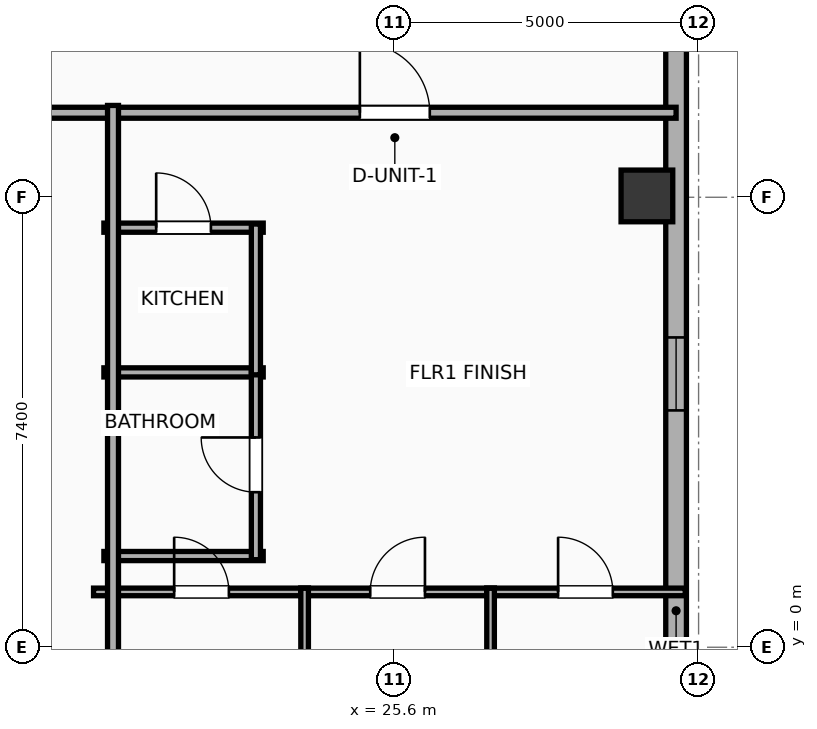
"""IFC4 building model, lengths in metres.
Left out: names, types, materials, properties, quantities, classifications, styles, units other than length and angle.
Written with IfcOpenShell. Run it as: python <this file> out.ifc"""

import sys

from ifc_helpers import new_model, si_unit, direction, frame, frame_2d, origin, origin_2d, place, context, subcontext, project, spatial, rectangle, hollow_rectangle, extrude, element, fill, save


model = new_model("IFC4")
c1 = context("Model", 3, precision=1e-05, world=origin(), true_north=direction((0.0, 1.0)))
c2 = subcontext(c1, "Body", "Model", "MODEL_VIEW")
j1 = project(units=[si_unit("LENGTHUNIT", "METRE"), si_unit("PLANEANGLEUNIT", "RADIAN")], contexts=[c1])
p1 = place(None, origin())
s1 = spatial("IfcSite", under=j1, at=p1, CompositionType="ELEMENT")
p2 = place(p1, origin())
s2 = spatial("IfcBuilding", under=s1, at=p2, CompositionType="ELEMENT")
p3 = place(p2, frame((0.0, 0.0, 208.0)))
s3 = spatial("IfcBuildingStorey", under=s2, at=p3, CompositionType="ELEMENT", Elevation=208.0)
p4 = place(p3, frame((29.75, 7.422, 0.0), z_axis=(0.0, 0.0, 1.0), x_axis=(1.0, 0.0, 0.0)))
e1 = element("IfcColumn", 1, at=p4, inside=s3, PredefinedType="COLUMN", context=c2, shape_type="SweptSolid", body=[
    extrude(hollow_rectangle(XDim=0.85, YDim=0.85, WallThickness=0.028, at=origin_2d()), origin(), (0.0, 0.0, 1.0), 3.9),
])
p5 = place(p3, frame((30.23, 16.583, 0.0), z_axis=(0.0, 0.0, 1.0), x_axis=(0.0, -1.0, 0.0)))
e2 = element("IfcWall", 2, at=p5, inside=s3, PredefinedType="ELEMENTEDWALL", context=c2, shape_type="SweptSolid", body=[
    extrude(rectangle(XDim=31.967, YDim=0.34, at=frame_2d((15.983, 0.0))), origin(), (0.0, 0.0, 1.0), 3.65),
])
p6 = place(p5, frame((29.844, 0.0, 0.75)))
e3 = element("IfcOpeningElement", 3, at=p6, cuts=e2, PredefinedType="OPENING", context=c2, shape_type="SweptSolid", body=[
    extrude(rectangle(XDim=1.2, YDim=2.05, at=frame_2d((0.6, 1.025))), frame((0.0, 0.18, 0.0), z_axis=(0.0, -1.0, 0.0), x_axis=(1.0, 0.0, 0.0)), (0.0, 0.0, 1.0), 0.36),
])
p7 = place(p5, frame((11.488, 0.0, 0.75)))
e4 = element("IfcOpeningElement", 4, at=p7, cuts=e2, PredefinedType="OPENING", context=c2, shape_type="SweptSolid", body=[
    extrude(rectangle(XDim=1.2, YDim=2.05, at=frame_2d((0.6, 1.025))), frame((0.0, 0.18, 0.0), z_axis=(0.0, -1.0, 0.0), x_axis=(1.0, 0.0, 0.0)), (0.0, 0.0, 1.0), 0.36),
])
p8 = place(p5, frame((20.338, 0.0, 0.75)))
e5 = element("IfcOpeningElement", 5, at=p8, cuts=e2, PredefinedType="OPENING", context=c2, shape_type="SweptSolid", body=[
    extrude(rectangle(XDim=1.2, YDim=2.05, at=frame_2d((0.6, 1.025))), frame((0.0, 0.18, 0.0), z_axis=(0.0, -1.0, 0.0), x_axis=(1.0, 0.0, 0.0)), (0.0, 0.0, 1.0), 0.36),
])
p9 = place(p3, frame((9.88, 8.79, 0.0), z_axis=(0.0, 0.0, 1.0), x_axis=(1.0, 0.0, 0.0)))
e6 = element("IfcWall", 6, at=p9, inside=s3, PredefinedType="PARTITIONING", context=c2, shape_type="SweptSolid", body=[
    extrude(rectangle(XDim=20.35, YDim=0.18, at=frame_2d((10.175, 0.0))), origin(), (0.0, 0.0, 1.0), 3.65),
])
p10 = place(p9, frame((15.149, 0.0, 0.0)))
e7 = element("IfcOpeningElement", 7, at=p10, cuts=e6, PredefinedType="OPENING", context=c2, shape_type="SweptSolid", body=[
    extrude(rectangle(XDim=1.15, YDim=2.05, at=frame_2d((0.575, 1.025))), frame((0.0, 0.1, 0.0), z_axis=(0.0, -1.0, 0.0), x_axis=(1.0, 0.0, 0.0)), (0.0, 0.0, 1.0), 0.2),
])
p11 = place(p3, frame((20.82, 6.9, 0.0), z_axis=(0.0, 0.0, 1.0), x_axis=(1.0, 0.0, 0.0)))
e8 = element("IfcWall", 8, at=p11, inside=s3, PredefinedType="PLUMBINGWALL", context=c2, shape_type="SweptSolid", body=[
    extrude(rectangle(XDim=2.62, YDim=0.15, at=frame_2d((1.31, 0.0))), origin(), (0.0, 0.0, 1.0), 3.65),
])
p12 = place(p11, frame((0.86, 0.0, 0.0)))
e9 = element("IfcOpeningElement", 9, at=p12, cuts=e8, PredefinedType="OPENING", context=c2, shape_type="SweptSolid", body=[
    extrude(rectangle(XDim=0.9, YDim=2.05, at=frame_2d((0.45, 1.025))), frame((0.0, 0.085, 0.0), z_axis=(0.0, -1.0, 0.0), x_axis=(1.0, 0.0, 0.0)), (0.0, 0.0, 1.0), 0.17),
])
for number, where, z_axis, x_axis in (
    (10, (20.82, 4.52, 0.0), (0.0, 0.0, 1.0), (1.0, 0.0, 0.0)),
    (11, (20.82, 1.5, 0.0), (0.0, 0.0, 1.0), (1.0, 0.0, 0.0)),
):
    element("IfcWall", number, at=place(p3, frame(where, z_axis=z_axis, x_axis=x_axis)), inside=s3, PredefinedType="PLUMBINGWALL", context=c2, shape_type="SweptSolid", body=[
        extrude(rectangle(XDim=2.62, YDim=0.15, at=frame_2d((1.31, 0.0))), origin(), (0.0, 0.0, 1.0), 3.65),
    ])
p13 = place(p3, frame((23.32, 1.44, 0.0), z_axis=(0.0, 0.0, 1.0), x_axis=(0.0, 1.0, 0.0)))
e12 = element("IfcWall", 12, at=p13, inside=s3, PredefinedType="PLUMBINGWALL", context=c2, shape_type="SweptSolid", body=[
    extrude(rectangle(XDim=3.12, YDim=0.15, at=frame_2d((1.56, 0.0))), origin(), (0.0, 0.0, 1.0), 3.65),
])
p14 = place(p13, frame((1.11, 0.0, 0.0)))
e13 = element("IfcOpeningElement", 13, at=p14, cuts=e12, PredefinedType="OPENING", context=c2, shape_type="SweptSolid", body=[
    extrude(rectangle(XDim=0.9, YDim=2.05, at=frame_2d((0.45, 1.025))), frame((0.0, 0.085, 0.0), z_axis=(0.0, -1.0, 0.0), x_axis=(1.0, 0.0, 0.0)), (0.0, 0.0, 1.0), 0.17),
])
p15 = place(p3, frame((23.32, 4.48, 0.0), z_axis=(0.0, 0.0, 1.0), x_axis=(0.0, 1.0, 0.0)))
e14 = element("IfcWall", 14, at=p15, inside=s3, PredefinedType="PLUMBINGWALL", context=c2, shape_type="SweptSolid", body=[
    extrude(rectangle(XDim=2.48, YDim=0.15, at=frame_2d((1.24, 0.0))), origin(), (0.0, 0.0, 1.0), 3.65),
])
p16 = place(p3, frame((20.65, 0.91, 0.0), z_axis=(0.0, 0.0, 1.0), x_axis=(1.0, 0.0, 0.0)))
e15 = element("IfcWall", 15, at=p16, inside=s3, PredefinedType="PARTITIONING", context=c2, shape_type="SweptSolid", body=[
    extrude(rectangle(XDim=3.534, YDim=0.125, at=frame_2d((1.767, 0.0))), origin(), (0.0, 0.0, 1.0), 3.65),
])
p17 = place(p16, frame((1.325, 0.0, 0.0)))
e16 = element("IfcOpeningElement", 16, at=p17, cuts=e15, PredefinedType="OPENING", context=c2, shape_type="SweptSolid", body=[
    extrude(rectangle(XDim=0.9, YDim=2.05, at=frame_2d((0.45, 1.025))), frame((0.0, 0.073, 0.0), z_axis=(0.0, -1.0, 0.0), x_axis=(1.0, 0.0, 0.0)), (0.0, 0.0, 1.0), 0.145),
])
p18 = place(p3, frame((24.059, 0.91, 0.0), z_axis=(0.0, 0.0, 1.0), x_axis=(1.0, 0.0, 0.0)))
e17 = element("IfcWall", 17, at=p18, inside=s3, PredefinedType="PARTITIONING", context=c2, shape_type="SweptSolid", body=[
    extrude(rectangle(XDim=3.183, YDim=0.125, at=frame_2d((1.591, 0.0))), origin(), (0.0, 0.0, 1.0), 3.65),
])
p19 = place(p18, frame((1.142, 0.0, 0.0)))
e18 = element("IfcOpeningElement", 18, at=p19, cuts=e17, PredefinedType="OPENING", context=c2, shape_type="SweptSolid", body=[
    extrude(rectangle(XDim=0.9, YDim=2.05, at=frame_2d((0.45, 1.025))), frame((0.0, 0.073, 0.0), z_axis=(0.0, -1.0, 0.0), x_axis=(1.0, 0.0, 0.0)), (0.0, 0.0, 1.0), 0.145),
])
p20 = place(p3, frame((27.116, 0.91, 0.0), z_axis=(0.0, 0.0, 1.0), x_axis=(1.0, 0.0, 0.0)))
e19 = element("IfcWall", 19, at=p20, inside=s3, PredefinedType="PARTITIONING", context=c2, shape_type="SweptSolid", body=[
    extrude(rectangle(XDim=3.263, YDim=0.125, at=frame_2d((1.632, 0.0))), origin(), (0.0, 0.0, 1.0), 3.65),
])
p21 = place(p20, frame((1.173, 0.0, 0.0)))
e20 = element("IfcOpeningElement", 20, at=p21, cuts=e19, PredefinedType="OPENING", context=c2, shape_type="SweptSolid", body=[
    extrude(rectangle(XDim=0.9, YDim=2.05, at=frame_2d((0.45, 1.025))), frame((0.0, 0.073, 0.0), z_axis=(0.0, -1.0, 0.0), x_axis=(1.0, 0.0, 0.0)), (0.0, 0.0, 1.0), 0.145),
])
for number, where, z_axis, x_axis in (
    (21, (27.179, -9.11, 0.0), (0.0, 0.0, 1.0), (0.0, 1.0, 0.0)),
    (22, (24.121, -9.11, 0.0), (0.0, 0.0, 1.0), (0.0, 1.0, 0.0)),
):
    element("IfcWall", number, at=place(p3, frame(where, z_axis=z_axis, x_axis=x_axis)), inside=s3, PredefinedType="PARTITIONING", context=c2, shape_type="SweptSolid", body=[
        extrude(rectangle(XDim=10.08, YDim=0.125, at=frame_2d((5.04, 0.0))), origin(), (0.0, 0.0, 1.0), 3.65),
    ])
p22 = place(p3, frame((20.97, -8.91, 0.0), z_axis=(0.0, 0.0, 1.0), x_axis=(0.0, 1.0, 0.0)))
e23 = element("IfcWall", 23, at=p22, inside=s3, PredefinedType="PARTITIONING", context=c2, shape_type="SweptSolid", body=[
    extrude(rectangle(XDim=17.82, YDim=0.18, at=frame_2d((8.91, 0.0))), origin(), (0.0, 0.0, 1.0), 3.65),
])
p23 = place(p7, origin())
e24 = element("IfcWindow", 24, at=p23, inside=s3, PartitioningType="SINGLE_PANEL", PredefinedType="WINDOW", context=c2, shape_type="SweptSolid", body=[
    extrude(rectangle(XDim=1.2, YDim=2.05, at=frame_2d((0.6, 1.025))), frame((0.0, 0.03, 0.0), z_axis=(0.0, -1.0, 0.0), x_axis=(1.0, 0.0, 0.0)), (0.0, 0.0, 1.0), 0.06),
])
fill(e4, e24)
p24 = place(p10, origin())
e25 = element("IfcDoor", 25, at=p24, inside=s3, OperationType="SINGLE_SWING_LEFT", PredefinedType="DOOR", context=c2, shape_type="SweptSolid", body=[
    extrude(rectangle(XDim=1.15, YDim=2.05, at=frame_2d((0.575, 1.025))), frame((0.0, 0.025, 0.0), z_axis=(0.0, -1.0, 0.0), x_axis=(1.0, 0.0, 0.0)), (0.0, 0.0, 1.0), 0.05),
])
fill(e7, e25)
p25 = place(p12, origin())
e26 = element("IfcDoor", 26, at=p25, inside=s3, OperationType="SINGLE_SWING_LEFT", PredefinedType="DOOR", context=c2, shape_type="SweptSolid", body=[
    extrude(rectangle(XDim=0.9, YDim=2.05, at=frame_2d((0.45, 1.025))), frame((0.0, 0.025, 0.0), z_axis=(0.0, -1.0, 0.0), x_axis=(1.0, 0.0, 0.0)), (0.0, 0.0, 1.0), 0.05),
])
fill(e9, e26)
p26 = place(p14, origin())
e27 = element("IfcDoor", 27, at=p26, inside=s3, OperationType="SINGLE_SWING_RIGHT", PredefinedType="DOOR", context=c2, shape_type="SweptSolid", body=[
    extrude(rectangle(XDim=0.9, YDim=2.05, at=frame_2d((0.45, 1.025))), frame((0.0, 0.025, 0.0), z_axis=(0.0, -1.0, 0.0), x_axis=(1.0, 0.0, 0.0)), (0.0, 0.0, 1.0), 0.05),
])
fill(e13, e27)
p27 = place(p17, origin())
e28 = element("IfcDoor", 28, at=p27, inside=s3, OperationType="SINGLE_SWING_LEFT", PredefinedType="DOOR", context=c2, shape_type="SweptSolid", body=[
    extrude(rectangle(XDim=0.9, YDim=2.05, at=frame_2d((0.45, 1.025))), frame((0.0, 0.025, 0.0), z_axis=(0.0, -1.0, 0.0), x_axis=(1.0, 0.0, 0.0)), (0.0, 0.0, 1.0), 0.05),
])
fill(e16, e28)
p28 = place(p19, origin())
e29 = element("IfcDoor", 29, at=p28, inside=s3, OperationType="SINGLE_SWING_RIGHT", PredefinedType="DOOR", context=c2, shape_type="SweptSolid", body=[
    extrude(rectangle(XDim=0.9, YDim=2.05, at=frame_2d((0.45, 1.025))), frame((0.0, 0.025, 0.0), z_axis=(0.0, -1.0, 0.0), x_axis=(1.0, 0.0, 0.0)), (0.0, 0.0, 1.0), 0.05),
])
fill(e18, e29)
p29 = place(p21, origin())
e30 = element("IfcDoor", 30, at=p29, inside=s3, OperationType="SINGLE_SWING_LEFT", PredefinedType="DOOR", context=c2, shape_type="SweptSolid", body=[
    extrude(rectangle(XDim=0.9, YDim=2.05, at=frame_2d((0.45, 1.025))), frame((0.0, 0.025, 0.0), z_axis=(0.0, -1.0, 0.0), x_axis=(1.0, 0.0, 0.0)), (0.0, 0.0, 1.0), 0.05),
])
fill(e20, e30)
save(model, sys.argv[1])
